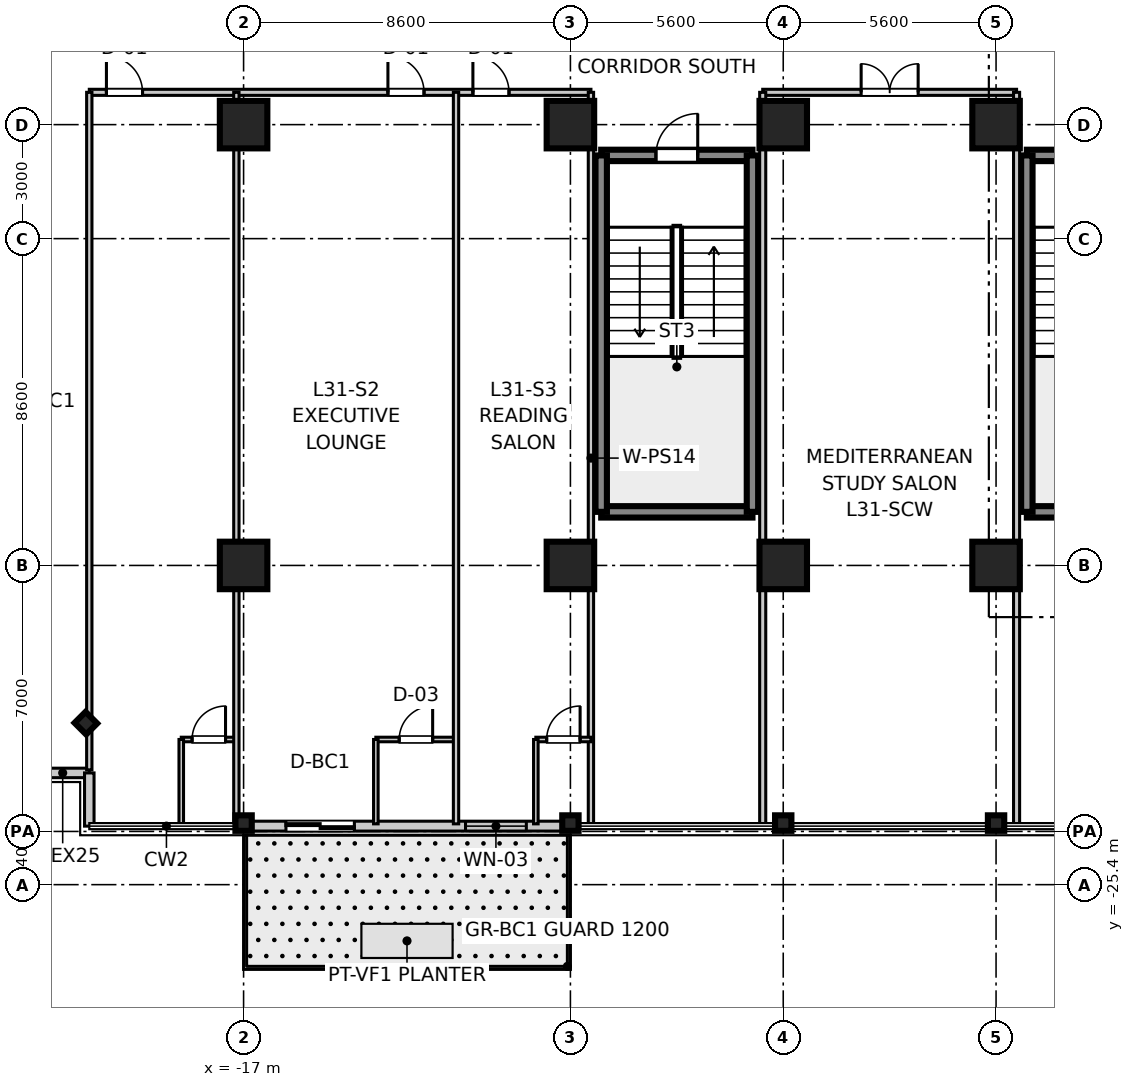
"""IFC4 building model, lengths in metres.
Left out: names, types, materials, properties, quantities, classifications, styles, units other than length and angle.
Written with IfcOpenShell. Run it as: python <this file> out.ifc"""

import sys

from ifc_helpers import new_model, si_unit, direction, frame, frame_2d, origin, origin_2d, place, context, subcontext, project, spatial, rectangle, i_section, extrude, source, transform, mapped, element, fill, save


model = new_model("IFC4")
c1 = context("Model", 3, precision=1e-05, world=origin(), true_north=direction((0.0, 1.0)))
c2 = subcontext(c1, "Body", "Model", "MODEL_VIEW")
j1 = project(units=[si_unit("LENGTHUNIT", "METRE"), si_unit("PLANEANGLEUNIT", "RADIAN")], contexts=[c1])
p1 = place(None, origin())
s1 = spatial("IfcSite", under=j1, at=p1, CompositionType="ELEMENT")
p2 = place(p1, origin())
s2 = spatial("IfcBuilding", under=s1, at=p2, CompositionType="ELEMENT")
p3 = place(p2, frame((0.0, 0.0, 124.8)))
s3 = spatial("IfcBuildingStorey", under=s2, at=p3, CompositionType="ELEMENT", Elevation=124.8)
m1 = source(origin(), c2, "Body", "SweptSolid", [
    extrude(rectangle(XDim=1.25, YDim=1.25, at=origin_2d()), origin(), (0.0, 0.0, 1.0), 3.605),
])
for number, where, z_axis, x_axis in (
    (1, (-17.0, -17.0, 0.0), (0.0, 0.0, 1.0), (1.0, 0.0, 0.0)),
    (2, (-17.0, -5.4, 0.0), (0.0, 0.0, 1.0), (1.0, 0.0, 0.0)),
    (3, (-8.4, -17.0, 0.0), (0.0, 0.0, 1.0), (1.0, 0.0, 0.0)),
    (4, (-8.4, -5.4, 0.0), (0.0, 0.0, 1.0), (1.0, 0.0, 0.0)),
    (5, (-2.8, -17.0, 0.0), (0.0, 0.0, 1.0), (1.0, 0.0, 0.0)),
    (6, (-2.8, -5.4, 0.0), (0.0, 0.0, 1.0), (1.0, 0.0, 0.0)),
    (7, (2.8, -17.0, 0.0), (0.0, 0.0, 1.0), (1.0, 0.0, 0.0)),
    (8, (2.8, -5.4, 0.0), (0.0, 0.0, 1.0), (1.0, 0.0, 0.0)),
):
    element("IfcColumn", number, at=place(p3, frame(where, z_axis=z_axis, x_axis=x_axis)), inside=s3, PredefinedType="COLUMN", context=c2, shape_type="MappedRepresentation", body=[
        mapped(m1, transform((0.0, 0.0, 0.0), scale=1.0)),
    ])
m2 = source(origin(), c2, "Body", "SweptSolid", [
    extrude(i_section(OverallWidth=0.409, OverallDepth=0.43, WebThickness=0.021, FlangeThickness=0.034, at=origin_2d()), origin(), (0.0, 0.0, 1.0), 3.605),
])
for number, where, z_axis, x_axis in (
    (9, (-17.0, -23.78, 0.0), (0.0, 0.0, 1.0), (0.0, 1.0, 0.0)),
    (10, (-8.4, -23.78, 0.0), (0.0, 0.0, 1.0), (0.0, 1.0, 0.0)),
    (11, (-2.8, -23.78, 0.0), (0.0, 0.0, 1.0), (0.0, 1.0, 0.0)),
    (12, (2.8, -23.78, 0.0), (0.0, 0.0, 1.0), (0.0, 1.0, 0.0)),
    (13, (-21.15, -21.15, 0.0), (0.0, 0.0, 1.0), (0.707, 0.707, 0.0)),
):
    element("IfcColumn", number, at=place(p3, frame(where, z_axis=z_axis, x_axis=x_axis)), inside=s3, PredefinedType="COLUMN", context=c2, shape_type="MappedRepresentation", body=[
        mapped(m2, transform((0.0, 0.0, 0.0), scale=1.0)),
    ])
m3 = source(origin(), c2, "Body", "SweptSolid", [
    extrude(rectangle(XDim=3.98, YDim=0.3, at=frame_2d((1.99, 0.0))), origin(), (0.0, 0.0, 1.0), 3.38),
])
for number, where, z_axis, x_axis in (
    (14, (3.61, -15.59, 0.0), (0.0, 0.0, 1.0), (1.0, 0.0, 0.0)),
    (15, (3.61, -6.21, 0.0), (0.0, 0.0, 1.0), (1.0, 0.0, 0.0)),
):
    element("IfcWall", number, at=place(p3, frame(where, z_axis=z_axis, x_axis=x_axis)), inside=s3, PredefinedType="SHEAR", context=c2, shape_type="MappedRepresentation", body=[
        mapped(m3, transform((0.0, 0.0, 0.0), scale=1.0)),
    ])
m4 = source(origin(), c2, "Body", "SweptSolid", [
    extrude(rectangle(XDim=9.38, YDim=0.3, at=frame_2d((4.69, 0.0))), origin(), (0.0, 0.0, 1.0), 3.38),
])
p4 = place(p3, frame((3.61, -15.59, 0.0), z_axis=(0.0, 0.0, 1.0), x_axis=(0.0, 1.0, 0.0)))
e16 = element("IfcWall", 16, at=p4, inside=s3, PredefinedType="SHEAR", context=c2, shape_type="MappedRepresentation", body=[
    mapped(m4, transform((0.0, 0.0, 0.0), scale=1.0)),
])
p5 = place(p3, frame((-7.59, -15.59, 0.0), z_axis=(0.0, 0.0, 1.0), x_axis=(1.0, 0.0, 0.0)))
e17 = element("IfcWall", 17, at=p5, inside=s3, PredefinedType="SHEAR", context=c2, shape_type="MappedRepresentation", body=[
    mapped(m3, transform((0.0, 0.0, 0.0), scale=1.0)),
])
p6 = place(p3, frame((-7.59, -6.21, 0.0), z_axis=(0.0, 0.0, 1.0), x_axis=(1.0, 0.0, 0.0)))
e18 = element("IfcWall", 18, at=p6, inside=s3, PredefinedType="SHEAR", context=c2, shape_type="MappedRepresentation", body=[
    mapped(m3, transform((0.0, 0.0, 0.0), scale=1.0)),
])
p7 = place(p6, frame((1.44, 0.0, 0.0)))
e19 = element("IfcOpeningElement", 19, at=p7, cuts=e18, PredefinedType="OPENING", context=c2, shape_type="SweptSolid", body=[
    extrude(rectangle(XDim=1.1, YDim=2.15, at=frame_2d((0.55, 1.075))), frame((0.0, 0.16, 0.0), z_axis=(0.0, -1.0, 0.0), x_axis=(1.0, 0.0, 0.0)), (0.0, 0.0, 1.0), 0.32),
])
for number, where, z_axis, x_axis in (
    (20, (-7.59, -15.59, 0.0), (0.0, 0.0, 1.0), (0.0, 1.0, 0.0)),
    (21, (-3.61, -15.59, 0.0), (0.0, 0.0, 1.0), (0.0, 1.0, 0.0)),
):
    element("IfcWall", number, at=place(p3, frame(where, z_axis=z_axis, x_axis=x_axis)), inside=s3, PredefinedType="SHEAR", context=c2, shape_type="MappedRepresentation", body=[
        mapped(m4, transform((0.0, 0.0, 0.0), scale=1.0)),
    ])
m5 = source(origin(), c2, "Body", "SweptSolid", [
    extrude(rectangle(XDim=1.4, YDim=0.25, at=frame_2d((0.7, 0.0))), origin(), (0.0, 0.0, 1.0), 3.38),
])
p8 = place(p3, frame((-22.46, -22.46, 0.0), z_axis=(0.0, 0.0, 1.0), x_axis=(1.0, 0.0, 0.0)))
e22 = element("IfcWall", 22, at=p8, inside=s3, PredefinedType="STANDARD", context=c2, shape_type="MappedRepresentation", body=[
    mapped(m5, transform((0.0, 0.0, 0.0), scale=1.0)),
])
m6 = source(origin(), c2, "Body", "SweptSolid", [
    extrude(rectangle(XDim=1.4, YDim=0.25, at=frame_2d((0.7, 0.0))), origin(), (0.0, 0.0, 1.0), 3.38),
])
p9 = place(p3, frame((-21.06, -23.86, 0.0), z_axis=(0.0, 0.0, 1.0), x_axis=(0.0, 1.0, 0.0)))
e23 = element("IfcWall", 23, at=p9, inside=s3, PredefinedType="STANDARD", context=c2, shape_type="MappedRepresentation", body=[
    mapped(m6, transform((0.0, 0.0, 0.0), scale=1.0)),
])
m7 = source(origin(), c2, "Body", "SweptSolid", [
    extrude(rectangle(XDim=8.6, YDim=0.26, at=frame_2d((4.3, 0.0))), origin(), (0.0, 0.0, 1.0), 2.86),
])
p10 = place(p3, frame((-17.0, -23.86, 0.0), z_axis=(0.0, 0.0, 1.0), x_axis=(1.0, 0.0, 0.0)))
e24 = element("IfcWall", 24, at=p10, inside=s3, PredefinedType="STANDARD", context=c2, shape_type="MappedRepresentation", body=[
    mapped(m7, transform((0.0, 0.0, 0.0), scale=1.0)),
])
p11 = place(p10, frame((1.115, 0.0, 0.0)))
e25 = element("IfcOpeningElement", 25, at=p11, cuts=e24, PredefinedType="OPENING", context=c2, shape_type="SweptSolid", body=[
    extrude(rectangle(XDim=1.8, YDim=2.25, at=frame_2d((0.9, 1.125))), frame((0.0, 0.14, 0.0), z_axis=(0.0, -1.0, 0.0), x_axis=(1.0, 0.0, 0.0)), (0.0, 0.0, 1.0), 0.28),
])
p12 = place(p10, frame((5.84, 0.0, 0.85)))
e26 = element("IfcOpeningElement", 26, at=p12, cuts=e24, PredefinedType="OPENING", context=c2, shape_type="SweptSolid", body=[
    extrude(rectangle(XDim=1.6, YDim=1.8, at=frame_2d((0.8, 0.9))), frame((0.0, 0.14, 0.0), z_axis=(0.0, -1.0, 0.0), x_axis=(1.0, 0.0, 0.0)), (0.0, 0.0, 1.0), 0.28),
])
m8 = source(origin(), c2, "Body", "SweptSolid", [
    extrude(rectangle(XDim=13.2, YDim=0.16, at=frame_2d((6.6, 0.0))), origin(), (0.0, 0.0, 1.0), 2.72),
])
p13 = place(p3, frame((-21.06, -4.55, 0.0), z_axis=(0.0, 0.0, 1.0), x_axis=(1.0, 0.0, 0.0)))
e27 = element("IfcWall", 27, at=p13, inside=s3, PredefinedType="PARTITIONING", context=c2, shape_type="MappedRepresentation", body=[
    mapped(m8, transform((0.0, 0.0, 0.0), scale=1.0)),
])
p14 = place(p13, frame((0.451, 0.0, 0.0)))
e28 = element("IfcOpeningElement", 28, at=p14, cuts=e27, PredefinedType="OPENING", context=c2, shape_type="SweptSolid", body=[
    extrude(rectangle(XDim=0.95, YDim=2.1, at=frame_2d((0.475, 1.05))), frame((0.0, 0.09, 0.0), z_axis=(0.0, -1.0, 0.0), x_axis=(1.0, 0.0, 0.0)), (0.0, 0.0, 1.0), 0.18),
])
p15 = place(p13, frame((7.858, 0.0, 0.0)))
e29 = element("IfcOpeningElement", 29, at=p15, cuts=e27, PredefinedType="OPENING", context=c2, shape_type="SweptSolid", body=[
    extrude(rectangle(XDim=0.95, YDim=2.1, at=frame_2d((0.475, 1.05))), frame((0.0, 0.09, 0.0), z_axis=(0.0, -1.0, 0.0), x_axis=(1.0, 0.0, 0.0)), (0.0, 0.0, 1.0), 0.18),
])
p16 = place(p13, frame((10.094, 0.0, 0.0)))
e30 = element("IfcOpeningElement", 30, at=p16, cuts=e27, PredefinedType="OPENING", context=c2, shape_type="SweptSolid", body=[
    extrude(rectangle(XDim=0.95, YDim=2.1, at=frame_2d((0.475, 1.05))), frame((0.0, 0.09, 0.0), z_axis=(0.0, -1.0, 0.0), x_axis=(1.0, 0.0, 0.0)), (0.0, 0.0, 1.0), 0.18),
])
m9 = source(origin(), c2, "Body", "SweptSolid", [
    extrude(rectangle(XDim=17.83, YDim=0.14, at=frame_2d((8.915, 0.0))), origin(), (0.0, 0.0, 1.0), 2.72),
])
p17 = place(p3, frame((-21.06, -22.38, 0.0), z_axis=(0.0, 0.0, 1.0), x_axis=(0.0, 1.0, 0.0)))
e31 = element("IfcWall", 31, at=p17, inside=s3, PredefinedType="PARTITIONING", context=c2, shape_type="MappedRepresentation", body=[
    mapped(m9, transform((0.0, 0.0, 0.0), scale=1.0)),
])
m10 = source(origin(), c2, "Body", "SweptSolid", [
    extrude(rectangle(XDim=19.25, YDim=0.14, at=frame_2d((9.625, 0.0))), origin(), (0.0, 0.0, 1.0), 2.72),
])
p18 = place(p3, frame((-7.86, -23.8, 0.0), z_axis=(0.0, 0.0, 1.0), x_axis=(0.0, 1.0, 0.0)))
e32 = element("IfcWall", 32, at=p18, inside=s3, PredefinedType="PARTITIONING", context=c2, shape_type="MappedRepresentation", body=[
    mapped(m10, transform((0.0, 0.0, 0.0), scale=1.0)),
])
m11 = source(origin(), c2, "Body", "SweptSolid", [
    extrude(rectangle(XDim=1.45, YDim=0.12, at=frame_2d((0.725, 0.0))), origin(), (0.0, 0.0, 1.0), 2.72),
])
p19 = place(p3, frame((-18.64, -21.58, 0.0), z_axis=(0.0, 0.0, 1.0), x_axis=(1.0, 0.0, 0.0)))
e33 = element("IfcWall", 33, at=p19, inside=s3, PredefinedType="PARTITIONING", context=c2, shape_type="MappedRepresentation", body=[
    mapped(m11, transform((0.0, 0.0, 0.0), scale=1.0)),
])
p20 = place(p19, frame((0.285, 0.0, 0.0)))
e34 = element("IfcOpeningElement", 34, at=p20, cuts=e33, PredefinedType="OPENING", context=c2, shape_type="SweptSolid", body=[
    extrude(rectangle(XDim=0.88, YDim=2.1, at=frame_2d((0.44, 1.05))), frame((0.0, 0.07, 0.0), z_axis=(0.0, -1.0, 0.0), x_axis=(1.0, 0.0, 0.0)), (0.0, 0.0, 1.0), 0.14),
])
m12 = source(origin(), c2, "Body", "SweptSolid", [
    extrude(rectangle(XDim=2.22, YDim=0.12, at=frame_2d((1.11, 0.0))), origin(), (0.0, 0.0, 1.0), 2.72),
])
p21 = place(p3, frame((-18.64, -23.8, 0.0), z_axis=(0.0, 0.0, 1.0), x_axis=(0.0, 1.0, 0.0)))
e35 = element("IfcWall", 35, at=p21, inside=s3, PredefinedType="PARTITIONING", context=c2, shape_type="MappedRepresentation", body=[
    mapped(m12, transform((0.0, 0.0, 0.0), scale=1.0)),
])
p22 = place(p3, frame((-17.19, -23.8, 0.0), z_axis=(0.0, 0.0, 1.0), x_axis=(0.0, 1.0, 0.0)))
e36 = element("IfcWall", 36, at=p22, inside=s3, PredefinedType="PARTITIONING", context=c2, shape_type="MappedRepresentation", body=[
    mapped(m10, transform((0.0, 0.0, 0.0), scale=1.0)),
])
m13 = source(origin(), c2, "Body", "SweptSolid", [
    extrude(rectangle(XDim=2.11, YDim=0.12, at=frame_2d((1.055, 0.0))), origin(), (0.0, 0.0, 1.0), 2.72),
])
p23 = place(p3, frame((-13.52, -21.58, 0.0), z_axis=(0.0, 0.0, 1.0), x_axis=(1.0, 0.0, 0.0)))
e37 = element("IfcWall", 37, at=p23, inside=s3, PredefinedType="PARTITIONING", context=c2, shape_type="MappedRepresentation", body=[
    mapped(m13, transform((0.0, 0.0, 0.0), scale=1.0)),
])
p24 = place(p23, frame((0.615, 0.0, 0.0)))
e38 = element("IfcOpeningElement", 38, at=p24, cuts=e37, PredefinedType="OPENING", context=c2, shape_type="SweptSolid", body=[
    extrude(rectangle(XDim=0.88, YDim=2.1, at=frame_2d((0.44, 1.05))), frame((0.0, 0.07, 0.0), z_axis=(0.0, -1.0, 0.0), x_axis=(1.0, 0.0, 0.0)), (0.0, 0.0, 1.0), 0.14),
])
p25 = place(p3, frame((-13.52, -23.8, 0.0), z_axis=(0.0, 0.0, 1.0), x_axis=(0.0, 1.0, 0.0)))
e39 = element("IfcWall", 39, at=p25, inside=s3, PredefinedType="PARTITIONING", context=c2, shape_type="MappedRepresentation", body=[
    mapped(m12, transform((0.0, 0.0, 0.0), scale=1.0)),
])
p26 = place(p3, frame((-11.41, -23.8, 0.0), z_axis=(0.0, 0.0, 1.0), x_axis=(0.0, 1.0, 0.0)))
e40 = element("IfcWall", 40, at=p26, inside=s3, PredefinedType="PARTITIONING", context=c2, shape_type="MappedRepresentation", body=[
    mapped(m10, transform((0.0, 0.0, 0.0), scale=1.0)),
])
p27 = place(p3, frame((-9.31, -21.58, 0.0), z_axis=(0.0, 0.0, 1.0), x_axis=(1.0, 0.0, 0.0)))
e41 = element("IfcWall", 41, at=p27, inside=s3, PredefinedType="PARTITIONING", context=c2, shape_type="MappedRepresentation", body=[
    mapped(m11, transform((0.0, 0.0, 0.0), scale=1.0)),
])
p28 = place(p27, frame((0.285, 0.0, 0.0)))
e42 = element("IfcOpeningElement", 42, at=p28, cuts=e41, PredefinedType="OPENING", context=c2, shape_type="SweptSolid", body=[
    extrude(rectangle(XDim=0.88, YDim=2.1, at=frame_2d((0.44, 1.05))), frame((0.0, 0.07, 0.0), z_axis=(0.0, -1.0, 0.0), x_axis=(1.0, 0.0, 0.0)), (0.0, 0.0, 1.0), 0.14),
])
p29 = place(p3, frame((-9.31, -23.8, 0.0), z_axis=(0.0, 0.0, 1.0), x_axis=(0.0, 1.0, 0.0)))
e43 = element("IfcWall", 43, at=p29, inside=s3, PredefinedType="PARTITIONING", context=c2, shape_type="MappedRepresentation", body=[
    mapped(m12, transform((0.0, 0.0, 0.0), scale=1.0)),
])
m14 = source(origin(), c2, "Body", "SweptSolid", [
    extrude(rectangle(XDim=6.68, YDim=0.16, at=frame_2d((3.34, 0.0))), origin(), (0.0, 0.0, 1.0), 2.72),
])
p30 = place(p3, frame((-3.34, -4.55, 0.0), z_axis=(0.0, 0.0, 1.0), x_axis=(1.0, 0.0, 0.0)))
e44 = element("IfcWall", 44, at=p30, inside=s3, PredefinedType="PARTITIONING", context=c2, shape_type="MappedRepresentation", body=[
    mapped(m14, transform((0.0, 0.0, 0.0), scale=1.0)),
])
p31 = place(p30, frame((2.59, 0.0, 0.0)))
e45 = element("IfcOpeningElement", 45, at=p31, cuts=e44, PredefinedType="OPENING", context=c2, shape_type="SweptSolid", body=[
    extrude(rectangle(XDim=1.5, YDim=2.15, at=frame_2d((0.75, 1.075))), frame((0.0, 0.09, 0.0), z_axis=(0.0, -1.0, 0.0), x_axis=(1.0, 0.0, 0.0)), (0.0, 0.0, 1.0), 0.18),
])
m15 = source(origin(), c2, "Body", "SweptSolid", [
    extrude(rectangle(XDim=19.25, YDim=0.16, at=frame_2d((9.625, 0.0))), origin(), (0.0, 0.0, 1.0), 2.72),
])
for number, where, z_axis, x_axis in (
    (46, (-3.34, -23.8, 0.0), (0.0, 0.0, 1.0), (0.0, 1.0, 0.0)),
    (47, (3.34, -23.8, 0.0), (0.0, 0.0, 1.0), (0.0, 1.0, 0.0)),
):
    element("IfcWall", number, at=place(p3, frame(where, z_axis=z_axis, x_axis=x_axis)), inside=s3, PredefinedType="PARTITIONING", context=c2, shape_type="MappedRepresentation", body=[
        mapped(m15, transform((0.0, 0.0, 0.0), scale=1.0)),
    ])
m16 = source(origin(), c2, "Body", "SweptSolid", [
    extrude(rectangle(XDim=1.1, YDim=2.15, at=frame_2d((0.55, 1.075))), frame((0.0, 0.025, 0.0), z_axis=(0.0, -1.0, 0.0), x_axis=(1.0, 0.0, 0.0)), (0.0, 0.0, 1.0), 0.05),
])
p32 = place(p7, frame((1.1, 0.0, 0.0), z_axis=(0.0, 0.0, 1.0), x_axis=(-1.0, 0.0, 0.0)))
e48 = element("IfcDoor", 48, at=p32, inside=s3, OperationType="SINGLE_SWING_RIGHT", PredefinedType="DOOR", context=c2, shape_type="MappedRepresentation", body=[
    mapped(m16, transform((0.0, 0.0, 0.0), scale=1.0)),
])
fill(e19, e48)
m17 = source(origin(), c2, "Body", "SweptSolid", [
    extrude(rectangle(XDim=0.88, YDim=2.1, at=frame_2d((0.44, 1.05))), frame((0.0, 0.025, 0.0), z_axis=(0.0, -1.0, 0.0), x_axis=(1.0, 0.0, 0.0)), (0.0, 0.0, 1.0), 0.05),
])
p33 = place(p20, frame((0.88, 0.0, 0.0), z_axis=(0.0, 0.0, 1.0), x_axis=(-1.0, 0.0, 0.0)))
e49 = element("IfcDoor", 49, at=p33, inside=s3, OperationType="SINGLE_SWING_RIGHT", PredefinedType="DOOR", context=c2, shape_type="MappedRepresentation", body=[
    mapped(m17, transform((0.0, 0.0, 0.0), scale=1.0)),
])
fill(e34, e49)
m18 = source(origin(), c2, "Body", "SweptSolid", [
    extrude(rectangle(XDim=0.95, YDim=2.1, at=frame_2d((0.475, 1.05))), frame((0.0, 0.025, 0.0), z_axis=(0.0, -1.0, 0.0), x_axis=(1.0, 0.0, 0.0)), (0.0, 0.0, 1.0), 0.05),
])
p34 = place(p14, frame((0.95, 0.0, 0.0), z_axis=(0.0, 0.0, 1.0), x_axis=(-1.0, 0.0, 0.0)))
e50 = element("IfcDoor", 50, at=p34, inside=s3, OperationType="SINGLE_SWING_LEFT", PredefinedType="DOOR", context=c2, shape_type="MappedRepresentation", body=[
    mapped(m18, transform((0.0, 0.0, 0.0), scale=1.0)),
])
fill(e28, e50)
p35 = place(p24, frame((0.88, 0.0, 0.0), z_axis=(0.0, 0.0, 1.0), x_axis=(-1.0, 0.0, 0.0)))
e51 = element("IfcDoor", 51, at=p35, inside=s3, OperationType="SINGLE_SWING_RIGHT", PredefinedType="DOOR", context=c2, shape_type="MappedRepresentation", body=[
    mapped(m17, transform((0.0, 0.0, 0.0), scale=1.0)),
])
fill(e38, e51)
p36 = place(p15, frame((0.95, 0.0, 0.0), z_axis=(0.0, 0.0, 1.0), x_axis=(-1.0, 0.0, 0.0)))
e52 = element("IfcDoor", 52, at=p36, inside=s3, OperationType="SINGLE_SWING_LEFT", PredefinedType="DOOR", context=c2, shape_type="MappedRepresentation", body=[
    mapped(m18, transform((0.0, 0.0, 0.0), scale=1.0)),
])
fill(e29, e52)
p37 = place(p28, frame((0.88, 0.0, 0.0), z_axis=(0.0, 0.0, 1.0), x_axis=(-1.0, 0.0, 0.0)))
e53 = element("IfcDoor", 53, at=p37, inside=s3, OperationType="SINGLE_SWING_RIGHT", PredefinedType="DOOR", context=c2, shape_type="MappedRepresentation", body=[
    mapped(m17, transform((0.0, 0.0, 0.0), scale=1.0)),
])
fill(e42, e53)
p38 = place(p16, frame((0.95, 0.0, 0.0), z_axis=(0.0, 0.0, 1.0), x_axis=(-1.0, 0.0, 0.0)))
e54 = element("IfcDoor", 54, at=p38, inside=s3, OperationType="SINGLE_SWING_LEFT", PredefinedType="DOOR", context=c2, shape_type="MappedRepresentation", body=[
    mapped(m18, transform((0.0, 0.0, 0.0), scale=1.0)),
])
fill(e30, e54)
m19 = source(origin(), c2, "Body", "SweptSolid", [
    extrude(rectangle(XDim=1.5, YDim=2.15, at=frame_2d((0.75, 1.075))), frame((0.0, 0.025, 0.0), z_axis=(0.0, -1.0, 0.0), x_axis=(1.0, 0.0, 0.0)), (0.0, 0.0, 1.0), 0.05),
])
p39 = place(p31, frame((1.5, 0.0, 0.0), z_axis=(0.0, 0.0, 1.0), x_axis=(-1.0, 0.0, 0.0)))
e55 = element("IfcDoor", 55, at=p39, inside=s3, OperationType="DOUBLE_DOOR_SINGLE_SWING", PredefinedType="DOOR", context=c2, shape_type="MappedRepresentation", body=[
    mapped(m19, transform((0.0, 0.0, 0.0), scale=1.0)),
])
fill(e45, e55)
m20 = source(origin(), c2, "Body", "SweptSolid", [
    extrude(rectangle(XDim=1.8, YDim=2.25, at=frame_2d((0.9, 1.125))), frame((0.0, 0.025, 0.0), z_axis=(0.0, -1.0, 0.0), x_axis=(1.0, 0.0, 0.0)), (0.0, 0.0, 1.0), 0.05),
])
p40 = place(p11, frame((1.8, 0.0, 0.0), z_axis=(0.0, 0.0, 1.0), x_axis=(-1.0, 0.0, 0.0)))
e56 = element("IfcDoor", 56, at=p40, inside=s3, OperationType="DOUBLE_DOOR_SLIDING", PredefinedType="DOOR", context=c2, shape_type="MappedRepresentation", body=[
    mapped(m20, transform((0.0, 0.0, 0.0), scale=1.0)),
])
fill(e25, e56)
m21 = source(origin(), c2, "Body", "SweptSolid", [
    extrude(rectangle(XDim=1.6, YDim=1.8, at=frame_2d((0.8, 0.9))), frame((0.0, 0.03, 0.0), z_axis=(0.0, -1.0, 0.0), x_axis=(1.0, 0.0, 0.0)), (0.0, 0.0, 1.0), 0.06),
])
p41 = place(p12, origin())
e57 = element("IfcWindow", 57, at=p41, inside=s3, PartitioningType="SINGLE_PANEL", PredefinedType="WINDOW", context=c2, shape_type="MappedRepresentation", body=[
    mapped(m21, transform((0.0, 0.0, 0.0), scale=1.0)),
])
fill(e26, e57)
save(model, sys.argv[1])
